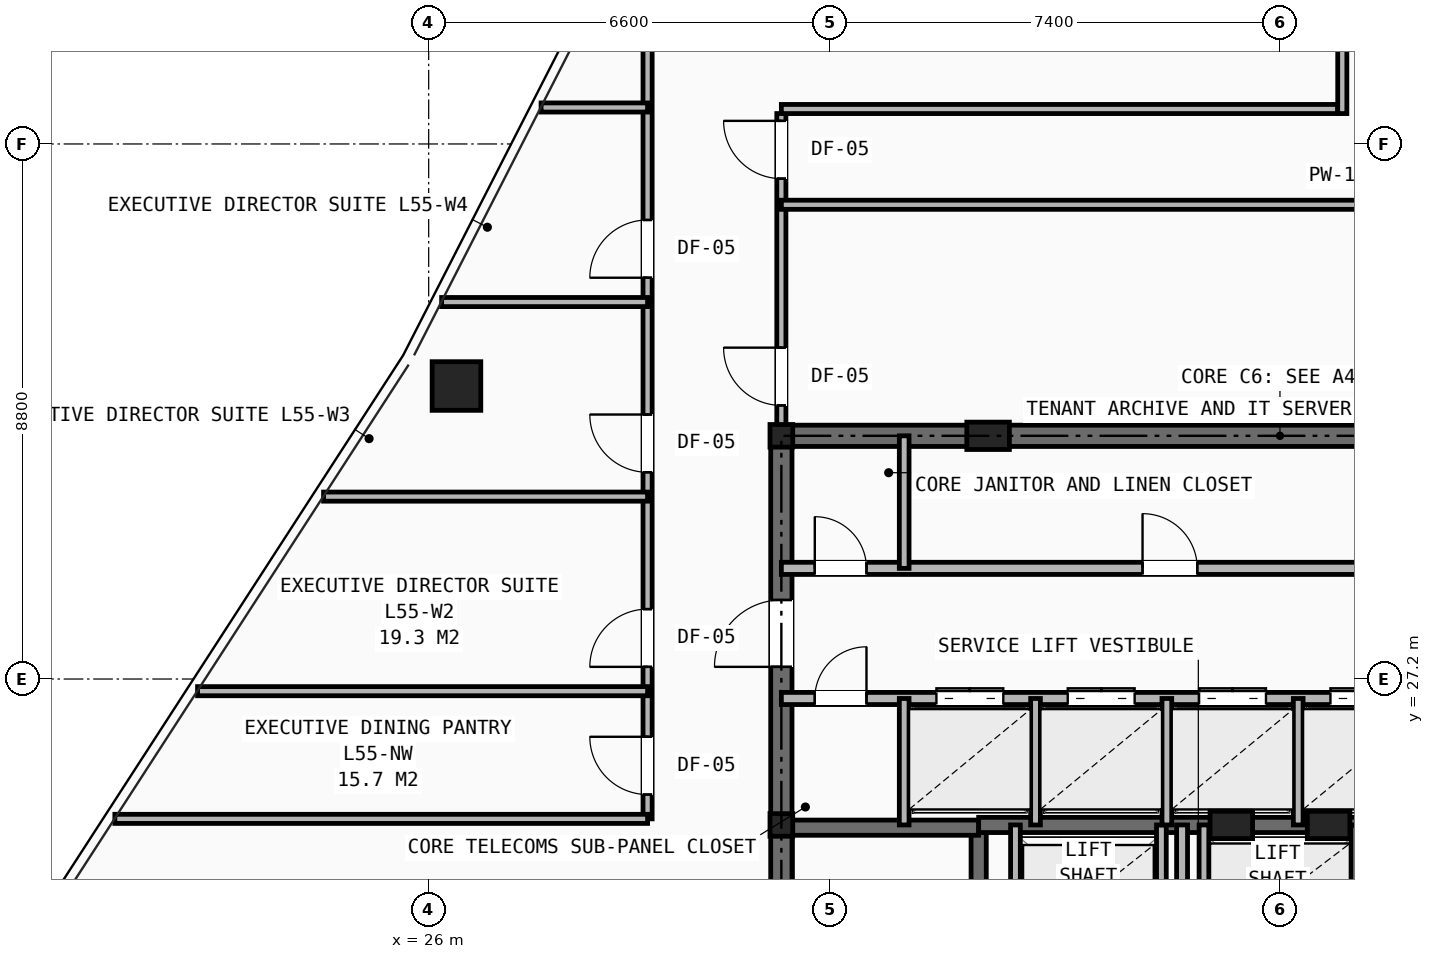
"""IFC4 building model, lengths in metres.
Left out: names, types, materials, properties, quantities, classifications, styles, units other than length and angle.
Written with IfcOpenShell. Run it as: python <this file> out.ifc"""

import sys

from ifc_helpers import new_model, si_unit, direction, frame, frame_2d, origin, origin_2d, place, context, subcontext, project, spatial, rectangle, hollow_rectangle, i_section, extrude, element, fill, save


model = new_model("IFC4")
c1 = context("Model", 3, precision=1e-05, world=origin(), true_north=direction((0.0, 1.0)))
c2 = subcontext(c1, "Body", "Model", "MODEL_VIEW")
j1 = project(units=[si_unit("LENGTHUNIT", "METRE"), si_unit("PLANEANGLEUNIT", "RADIAN")], contexts=[c1])
p1 = place(None, origin())
s1 = spatial("IfcSite", under=j1, at=p1, CompositionType="ELEMENT")
p2 = place(p1, origin())
s2 = spatial("IfcBuilding", under=s1, at=p2, CompositionType="ELEMENT")
p3 = place(p2, frame((0.0, 0.0, 193.05)))
s3 = spatial("IfcBuildingStorey", under=s2, at=p3, CompositionType="ELEMENT", Elevation=193.05)
for number, where, z_axis, x_axis in (
    (1, (31.8, 24.8, 0.0), (0.0, 0.0, 1.0), (1.0, 0.0, 0.0)),
    (2, (31.8, 31.2, 0.0), (0.0, 0.0, 1.0), (1.0, 0.0, 0.0)),
):
    element("IfcColumn", number, at=place(p3, frame(where, z_axis=z_axis, x_axis=x_axis)), inside=s3, PredefinedType="COLUMN", context=c2, shape_type="SweptSolid", body=[
        extrude(i_section(OverallWidth=0.374, OverallDepth=0.372, WebThickness=0.016, FlangeThickness=0.026, at=origin_2d()), origin(), (0.0, 0.0, 1.0), 3.45),
    ])
for number, where, z_axis, x_axis in (
    (3, (35.2, 31.2, 0.0), (0.0, 0.0, 1.0), (1.0, 0.0, 0.0)),
    (4, (39.2, 24.8, 0.0), (0.0, 0.0, 1.0), (1.0, 0.0, 0.0)),
    (5, (40.8, 24.8, 0.0), (0.0, 0.0, 1.0), (1.0, 0.0, 0.0)),
):
    element("IfcColumn", number, at=place(p3, frame(where, z_axis=z_axis, x_axis=x_axis)), inside=s3, PredefinedType="PILASTER", context=c2, shape_type="SweptSolid", body=[
        extrude(rectangle(XDim=0.7, YDim=0.45, at=origin_2d()), origin(), (0.0, 0.0, 1.0), 3.45),
    ])
p4 = place(p3, frame((26.457, 32.019, 0.0), z_axis=(0.0, 0.0, 1.0), x_axis=(1.0, 0.0, 0.0)))
e6 = element("IfcColumn", 6, at=p4, inside=s3, PredefinedType="COLUMN", context=c2, shape_type="SweptSolid", body=[
    extrude(hollow_rectangle(XDim=0.8, YDim=0.8, WallThickness=0.055, at=origin_2d()), origin(), (0.0, 0.0, 1.0), 3.45),
])
p5 = place(p3, frame((31.8, 31.2, 0.0), z_axis=(0.0, 0.0, 1.0), x_axis=(1.0, 0.0, 0.0)))
e7 = element("IfcWall", 7, at=p5, inside=s3, PredefinedType="SHEAR", context=c2, shape_type="SweptSolid", body=[
    extrude(rectangle(XDim=16.4, YDim=0.35, at=frame_2d((8.2, 0.0))), origin(), (0.0, 0.0, 1.0), 3.03),
])
p6 = place(p3, frame((31.8, 16.4, 0.0), z_axis=(0.0, 0.0, 1.0), x_axis=(0.0, 1.0, 0.0)))
e8 = element("IfcWall", 8, at=p6, inside=s3, PredefinedType="SHEAR", context=c2, shape_type="SweptSolid", body=[
    extrude(rectangle(XDim=14.8, YDim=0.35, at=frame_2d((7.4, 0.0))), origin(), (0.0, 0.0, 1.0), 3.03),
])
p7 = place(p6, frame((11.0, 0.0, 0.0)))
e9 = element("IfcOpeningElement", 9, at=p7, cuts=e8, PredefinedType="OPENING", context=c2, shape_type="SweptSolid", body=[
    extrude(rectangle(XDim=1.1, YDim=2.15, at=frame_2d((0.55, 1.075))), frame((0.0, 0.185, 0.0), z_axis=(0.0, -1.0, 0.0), x_axis=(1.0, 0.0, 0.0)), (0.0, 0.0, 1.0), 0.37),
])
p8 = place(p3, frame((35.045, 16.4, 0.0), z_axis=(0.0, 0.0, 1.0), x_axis=(0.0, 1.0, 0.0)))
e10 = element("IfcWall", 10, at=p8, inside=s3, PredefinedType="SHEAR", context=c2, shape_type="SweptSolid", body=[
    extrude(rectangle(XDim=8.4, YDim=0.25, at=frame_2d((4.2, 0.0))), origin(), (0.0, 0.0, 1.0), 3.03),
])
p9 = place(p8, frame((0.45, 0.0, 0.0)))
e11 = element("IfcOpeningElement", 11, at=p9, cuts=e10, PredefinedType="OPENING", context=c2, shape_type="SweptSolid", body=[
    extrude(rectangle(XDim=0.95, YDim=2.1, at=frame_2d((0.475, 1.05))), frame((0.0, 0.135, 0.0), z_axis=(0.0, -1.0, 0.0), x_axis=(1.0, 0.0, 0.0)), (0.0, 0.0, 1.0), 0.27),
])
p10 = place(p3, frame((31.8, 24.755, 0.0), z_axis=(0.0, 0.0, 1.0), x_axis=(1.0, 0.0, 0.0)))
e12 = element("IfcWall", 12, at=p10, inside=s3, PredefinedType="SHEAR", context=c2, shape_type="SweptSolid", body=[
    extrude(rectangle(XDim=3.245, YDim=0.25, at=frame_2d((1.623, 0.0))), origin(), (0.0, 0.0, 1.0), 3.03),
])
p11 = place(p3, frame((35.045, 24.8, 0.0), z_axis=(0.0, 0.0, 1.0), x_axis=(1.0, 0.0, 0.0)))
e13 = element("IfcWall", 13, at=p11, inside=s3, PredefinedType="SHEAR", context=c2, shape_type="SweptSolid", body=[
    extrude(rectangle(XDim=9.91, YDim=0.25, at=frame_2d((4.955, 0.0))), origin(), (0.0, 0.0, 1.0), 3.03),
])
p12 = place(p3, frame((38.39, 16.4, 0.0), z_axis=(0.0, 0.0, 1.0), x_axis=(0.0, 1.0, 0.0)))
e14 = element("IfcWall", 14, at=p12, inside=s3, PredefinedType="PARTITIONING", context=c2, shape_type="SweptSolid", body=[
    extrude(rectangle(XDim=8.4, YDim=0.18, at=frame_2d((4.2, 0.0))), origin(), (0.0, 0.0, 1.0), 2.758),
])
p13 = place(p12, frame((4.45, 0.0, 0.0)))
e15 = element("IfcOpeningElement", 15, at=p13, cuts=e14, PredefinedType="OPENING", context=c2, shape_type="SweptSolid", body=[
    extrude(rectangle(XDim=0.95, YDim=2.1, at=frame_2d((0.475, 1.05))), frame((0.0, 0.1, 0.0), z_axis=(0.0, -1.0, 0.0), x_axis=(1.0, 0.0, 0.0)), (0.0, 0.0, 1.0), 0.2),
])
for number, where, z_axis, x_axis in (
    (16, (35.65, 22.48, 0.0), (0.0, 0.0, 1.0), (0.0, 1.0, 0.0)),
    (17, (38.05, 22.48, 0.0), (0.0, 0.0, 1.0), (0.0, 1.0, 0.0)),
    (18, (38.75, 22.48, 0.0), (0.0, 0.0, 1.0), (0.0, 1.0, 0.0)),
    (19, (41.25, 22.48, 0.0), (0.0, 0.0, 1.0), (0.0, 1.0, 0.0)),
):
    element("IfcWall", number, at=place(p3, frame(where, z_axis=z_axis, x_axis=x_axis)), inside=s3, PredefinedType="SOLIDWALL", context=c2, shape_type="SweptSolid", body=[
        extrude(rectangle(XDim=2.32, YDim=0.16, at=frame_2d((1.16, 0.0))), origin(), (0.0, 0.0, 1.0), 3.03),
    ])
p14 = place(p3, frame((31.8, 29.02, 0.0), z_axis=(0.0, 0.0, 1.0), x_axis=(1.0, 0.0, 0.0)))
e20 = element("IfcWall", 20, at=p14, inside=s3, PredefinedType="SOLIDWALL", context=c2, shape_type="SweptSolid", body=[
    extrude(rectangle(XDim=16.4, YDim=0.2, at=frame_2d((8.2, 0.0))), origin(), (0.0, 0.0, 1.0), 2.485),
])
p15 = place(p14, frame((0.55, 0.0, 0.0)))
e21 = element("IfcOpeningElement", 21, at=p15, cuts=e20, PredefinedType="OPENING", context=c2, shape_type="SweptSolid", body=[
    extrude(rectangle(XDim=0.85, YDim=2.05, at=frame_2d((0.425, 1.025))), frame((0.0, 0.11, 0.0), z_axis=(0.0, -1.0, 0.0), x_axis=(1.0, 0.0, 0.0)), (0.0, 0.0, 1.0), 0.22),
])
p16 = place(p14, frame((5.94, 0.0, 0.0)))
e22 = element("IfcOpeningElement", 22, at=p16, cuts=e20, PredefinedType="OPENING", context=c2, shape_type="SweptSolid", body=[
    extrude(rectangle(XDim=0.9, YDim=2.1, at=frame_2d((0.45, 1.05))), frame((0.0, 0.11, 0.0), z_axis=(0.0, -1.0, 0.0), x_axis=(1.0, 0.0, 0.0)), (0.0, 0.0, 1.0), 0.22),
])
p17 = place(p3, frame((31.8, 26.88, 0.0), z_axis=(0.0, 0.0, 1.0), x_axis=(1.0, 0.0, 0.0)))
e23 = element("IfcWall", 23, at=p17, inside=s3, PredefinedType="SOLIDWALL", context=c2, shape_type="SweptSolid", body=[
    extrude(rectangle(XDim=16.4, YDim=0.2, at=frame_2d((8.2, 0.0))), origin(), (0.0, 0.0, 1.0), 2.485),
])
p18 = place(p17, frame((0.55, 0.0, 0.0)))
e24 = element("IfcOpeningElement", 24, at=p18, cuts=e23, PredefinedType="OPENING", context=c2, shape_type="SweptSolid", body=[
    extrude(rectangle(XDim=0.85, YDim=2.05, at=frame_2d((0.425, 1.025))), frame((0.0, 0.11, 0.0), z_axis=(0.0, -1.0, 0.0), x_axis=(1.0, 0.0, 0.0)), (0.0, 0.0, 1.0), 0.22),
])
p19 = place(p17, frame((2.55, 0.0, 0.0)))
e25 = element("IfcOpeningElement", 25, at=p19, cuts=e23, PredefinedType="OPENING", context=c2, shape_type="SweptSolid", body=[
    extrude(rectangle(XDim=1.1, YDim=2.15, at=frame_2d((0.55, 1.075))), frame((0.0, 0.11, 0.0), z_axis=(0.0, -1.0, 0.0), x_axis=(1.0, 0.0, 0.0)), (0.0, 0.0, 1.0), 0.22),
])
p20 = place(p17, frame((4.71, 0.0, 0.0)))
e26 = element("IfcOpeningElement", 26, at=p20, cuts=e23, PredefinedType="OPENING", context=c2, shape_type="SweptSolid", body=[
    extrude(rectangle(XDim=1.1, YDim=2.15, at=frame_2d((0.55, 1.075))), frame((0.0, 0.11, 0.0), z_axis=(0.0, -1.0, 0.0), x_axis=(1.0, 0.0, 0.0)), (0.0, 0.0, 1.0), 0.22),
])
p21 = place(p17, frame((6.87, 0.0, 0.0)))
e27 = element("IfcOpeningElement", 27, at=p21, cuts=e23, PredefinedType="OPENING", context=c2, shape_type="SweptSolid", body=[
    extrude(rectangle(XDim=1.1, YDim=2.15, at=frame_2d((0.55, 1.075))), frame((0.0, 0.11, 0.0), z_axis=(0.0, -1.0, 0.0), x_axis=(1.0, 0.0, 0.0)), (0.0, 0.0, 1.0), 0.22),
])
p22 = place(p17, frame((9.03, 0.0, 0.0)))
e28 = element("IfcOpeningElement", 28, at=p22, cuts=e23, PredefinedType="OPENING", context=c2, shape_type="SweptSolid", body=[
    extrude(rectangle(XDim=1.1, YDim=2.15, at=frame_2d((0.55, 1.075))), frame((0.0, 0.11, 0.0), z_axis=(0.0, -1.0, 0.0), x_axis=(1.0, 0.0, 0.0)), (0.0, 0.0, 1.0), 0.22),
])
p23 = place(p3, frame((33.82, 29.02, 0.0), z_axis=(0.0, 0.0, 1.0), x_axis=(0.0, 1.0, 0.0)))
e29 = element("IfcWall", 29, at=p23, inside=s3, PredefinedType="SOLIDWALL", context=c2, shape_type="SweptSolid", body=[
    extrude(rectangle(XDim=2.18, YDim=0.16, at=frame_2d((1.09, 0.0))), origin(), (0.0, 0.0, 1.0), 2.758),
])
for number, where, z_axis, x_axis in (
    (30, (33.82, 24.8, 0.0), (0.0, 0.0, 1.0), (0.0, 1.0, 0.0)),
    (31, (35.98, 24.8, 0.0), (0.0, 0.0, 1.0), (0.0, 1.0, 0.0)),
    (32, (38.14, 24.8, 0.0), (0.0, 0.0, 1.0), (0.0, 1.0, 0.0)),
    (33, (40.3, 24.8, 0.0), (0.0, 0.0, 1.0), (0.0, 1.0, 0.0)),
):
    element("IfcWall", number, at=place(p3, frame(where, z_axis=z_axis, x_axis=x_axis)), inside=s3, PredefinedType="SOLIDWALL", context=c2, shape_type="SweptSolid", body=[
        extrude(rectangle(XDim=2.08, YDim=0.16, at=frame_2d((1.04, 0.0))), origin(), (0.0, 0.0, 1.0), 3.03),
    ])
p24 = place(p3, frame((29.6, 24.9, 0.0), z_axis=(0.0, 0.0, 1.0), x_axis=(0.0, 1.0, 0.0)))
e34 = element("IfcWall", 34, at=p24, inside=s3, PredefinedType="PARTITIONING", context=c2, shape_type="SweptSolid", body=[
    extrude(rectangle(XDim=13.9, YDim=0.15, at=frame_2d((6.95, 0.0))), origin(), (0.0, 0.0, 1.0), 2.241),
])
p25 = place(p24, frame((0.4, 0.0, 0.0)))
e35 = element("IfcOpeningElement", 35, at=p25, cuts=e34, PredefinedType="OPENING", context=c2, shape_type="SweptSolid", body=[
    extrude(rectangle(XDim=0.95, YDim=2.1, at=frame_2d((0.475, 1.05))), frame((0.0, 0.085, 0.0), z_axis=(0.0, -1.0, 0.0), x_axis=(1.0, 0.0, 0.0)), (0.0, 0.0, 1.0), 0.17),
])
p26 = place(p24, frame((2.5, 0.0, 0.0)))
e36 = element("IfcOpeningElement", 36, at=p26, cuts=e34, PredefinedType="OPENING", context=c2, shape_type="SweptSolid", body=[
    extrude(rectangle(XDim=0.95, YDim=2.1, at=frame_2d((0.475, 1.05))), frame((0.0, 0.085, 0.0), z_axis=(0.0, -1.0, 0.0), x_axis=(1.0, 0.0, 0.0)), (0.0, 0.0, 1.0), 0.17),
])
p27 = place(p24, frame((5.7, 0.0, 0.0)))
e37 = element("IfcOpeningElement", 37, at=p27, cuts=e34, PredefinedType="OPENING", context=c2, shape_type="SweptSolid", body=[
    extrude(rectangle(XDim=0.95, YDim=2.1, at=frame_2d((0.475, 1.05))), frame((0.0, 0.085, 0.0), z_axis=(0.0, -1.0, 0.0), x_axis=(1.0, 0.0, 0.0)), (0.0, 0.0, 1.0), 0.17),
])
p28 = place(p24, frame((8.9, 0.0, 0.0)))
e38 = element("IfcOpeningElement", 38, at=p28, cuts=e34, PredefinedType="OPENING", context=c2, shape_type="SweptSolid", body=[
    extrude(rectangle(XDim=0.95, YDim=2.1, at=frame_2d((0.475, 1.05))), frame((0.0, 0.085, 0.0), z_axis=(0.0, -1.0, 0.0), x_axis=(1.0, 0.0, 0.0)), (0.0, 0.0, 1.0), 0.17),
])
p29 = place(p3, frame((31.8, 31.2, 0.0), z_axis=(0.0, 0.0, 1.0), x_axis=(0.0, 1.0, 0.0)))
e39 = element("IfcWall", 39, at=p29, inside=s3, PredefinedType="PARTITIONING", context=c2, shape_type="SweptSolid", body=[
    extrude(rectangle(XDim=5.3, YDim=0.15, at=frame_2d((2.65, 0.0))), origin(), (0.0, 0.0, 1.0), 2.241),
])
p30 = place(p29, frame((0.5, 0.0, 0.0)))
e40 = element("IfcOpeningElement", 40, at=p30, cuts=e39, PredefinedType="OPENING", context=c2, shape_type="SweptSolid", body=[
    extrude(rectangle(XDim=0.95, YDim=2.1, at=frame_2d((0.475, 1.05))), frame((0.0, 0.085, 0.0), z_axis=(0.0, -1.0, 0.0), x_axis=(1.0, 0.0, 0.0)), (0.0, 0.0, 1.0), 0.17),
])
p31 = place(p29, frame((4.23, 0.0, 0.0)))
e41 = element("IfcOpeningElement", 41, at=p31, cuts=e39, PredefinedType="OPENING", context=c2, shape_type="SweptSolid", body=[
    extrude(rectangle(XDim=0.95, YDim=2.1, at=frame_2d((0.475, 1.05))), frame((0.0, 0.085, 0.0), z_axis=(0.0, -1.0, 0.0), x_axis=(1.0, 0.0, 0.0)), (0.0, 0.0, 1.0), 0.17),
])
p32 = place(p3, frame((20.839, 24.9, 0.0), z_axis=(0.0, 0.0, 1.0), x_axis=(1.0, 0.0, 0.0)))
e42 = element("IfcWall", 42, at=p32, inside=s3, PredefinedType="PARTITIONING", context=c2, shape_type="SweptSolid", body=[
    extrude(rectangle(XDim=8.761, YDim=0.15, at=frame_2d((4.38, 0.0))), origin(), (0.0, 0.0, 1.0), 2.409),
])
p33 = place(p3, frame((22.199, 27.0, 0.0), z_axis=(0.0, 0.0, 1.0), x_axis=(1.0, 0.0, 0.0)))
e43 = element("IfcWall", 43, at=p33, inside=s3, PredefinedType="PARTITIONING", context=c2, shape_type="SweptSolid", body=[
    extrude(rectangle(XDim=7.401, YDim=0.15, at=frame_2d((3.701, 0.0))), origin(), (0.0, 0.0, 1.0), 2.409),
])
p34 = place(p3, frame((24.271, 30.2, 0.0), z_axis=(0.0, 0.0, 1.0), x_axis=(1.0, 0.0, 0.0)))
e44 = element("IfcWall", 44, at=p34, inside=s3, PredefinedType="PARTITIONING", context=c2, shape_type="SweptSolid", body=[
    extrude(rectangle(XDim=5.329, YDim=0.15, at=frame_2d((2.664, 0.0))), origin(), (0.0, 0.0, 1.0), 2.409),
])
p35 = place(p3, frame((26.213, 33.4, 0.0), z_axis=(0.0, 0.0, 1.0), x_axis=(1.0, 0.0, 0.0)))
e45 = element("IfcWall", 45, at=p35, inside=s3, PredefinedType="PARTITIONING", context=c2, shape_type="SweptSolid", body=[
    extrude(rectangle(XDim=3.387, YDim=0.15, at=frame_2d((1.693, 0.0))), origin(), (0.0, 0.0, 1.0), 2.409),
])
p36 = place(p3, frame((27.849, 36.6, 0.0), z_axis=(0.0, 0.0, 1.0), x_axis=(1.0, 0.0, 0.0)))
e46 = element("IfcWall", 46, at=p36, inside=s3, PredefinedType="PARTITIONING", context=c2, shape_type="SweptSolid", body=[
    extrude(rectangle(XDim=1.751, YDim=0.15, at=frame_2d((0.876, 0.0))), origin(), (0.0, 0.0, 1.0), 2.409),
])
p37 = place(p3, frame((31.8, 35.0, 0.0), z_axis=(0.0, 0.0, 1.0), x_axis=(1.0, 0.0, 0.0)))
e47 = element("IfcWall", 47, at=p37, inside=s3, PredefinedType="PARTITIONING", context=c2, shape_type="SweptSolid", body=[
    extrude(rectangle(XDim=21.169, YDim=0.15, at=frame_2d((10.584, 0.0))), origin(), (0.0, 0.0, 1.0), 2.409),
])
p38 = place(p3, frame((31.8, 36.575, 0.0), z_axis=(0.0, 0.0, 1.0), x_axis=(1.0, 0.0, 0.0)))
e48 = element("IfcWall", 48, at=p38, inside=s3, PredefinedType="PARTITIONING", context=c2, shape_type="SweptSolid", body=[
    extrude(rectangle(XDim=9.15, YDim=0.15, at=frame_2d((4.575, 0.0))), origin(), (0.0, 0.0, 1.0), 2.613),
])
p39 = place(p3, frame((41.025, 36.5, 0.0), z_axis=(0.0, 0.0, 1.0), x_axis=(0.0, 1.0, 0.0)))
e49 = element("IfcWall", 49, at=p39, inside=s3, PredefinedType="PARTITIONING", context=c2, shape_type="SweptSolid", body=[
    extrude(rectangle(XDim=1.95, YDim=0.15, at=frame_2d((0.975, 0.0))), origin(), (0.0, 0.0, 1.0), 3.03),
])
p40 = place(p15, origin())
e50 = element("IfcDoor", 50, at=p40, inside=s3, OperationType="SINGLE_SWING_LEFT", PredefinedType="DOOR", context=c2, shape_type="SweptSolid", body=[
    extrude(rectangle(XDim=0.85, YDim=2.05, at=frame_2d((0.425, 1.025))), frame((0.0, 0.025, 0.0), z_axis=(0.0, -1.0, 0.0), x_axis=(1.0, 0.0, 0.0)), (0.0, 0.0, 1.0), 0.05),
])
fill(e21, e50)
p41 = place(p18, origin())
e51 = element("IfcDoor", 51, at=p41, inside=s3, OperationType="SINGLE_SWING_RIGHT", PredefinedType="DOOR", context=c2, shape_type="SweptSolid", body=[
    extrude(rectangle(XDim=0.85, YDim=2.05, at=frame_2d((0.425, 1.025))), frame((0.0, 0.025, 0.0), z_axis=(0.0, -1.0, 0.0), x_axis=(1.0, 0.0, 0.0)), (0.0, 0.0, 1.0), 0.05),
])
fill(e24, e51)
p42 = place(p7, origin())
e52 = element("IfcDoor", 52, at=p42, inside=s3, OperationType="SINGLE_SWING_LEFT", PredefinedType="DOOR", context=c2, shape_type="SweptSolid", body=[
    extrude(rectangle(XDim=1.1, YDim=2.15, at=frame_2d((0.55, 1.075))), frame((0.0, 0.025, 0.0), z_axis=(0.0, -1.0, 0.0), x_axis=(1.0, 0.0, 0.0)), (0.0, 0.0, 1.0), 0.05),
])
fill(e9, e52)
p43 = place(p16, origin())
e53 = element("IfcDoor", 53, at=p43, inside=s3, OperationType="SINGLE_SWING_LEFT", PredefinedType="DOOR", context=c2, shape_type="SweptSolid", body=[
    extrude(rectangle(XDim=0.9, YDim=2.1, at=frame_2d((0.45, 1.05))), frame((0.0, 0.025, 0.0), z_axis=(0.0, -1.0, 0.0), x_axis=(1.0, 0.0, 0.0)), (0.0, 0.0, 1.0), 0.05),
])
fill(e22, e53)
p44 = place(p19, origin())
e54 = element("IfcDoor", 54, at=p44, inside=s3, OperationType="DOUBLE_DOOR_SLIDING", PredefinedType="DOOR", context=c2, shape_type="SweptSolid", body=[
    extrude(rectangle(XDim=1.1, YDim=2.15, at=frame_2d((0.55, 1.075))), frame((0.0, 0.025, 0.0), z_axis=(0.0, -1.0, 0.0), x_axis=(1.0, 0.0, 0.0)), (0.0, 0.0, 1.0), 0.05),
])
fill(e25, e54)
p45 = place(p20, origin())
e55 = element("IfcDoor", 55, at=p45, inside=s3, OperationType="DOUBLE_DOOR_SLIDING", PredefinedType="DOOR", context=c2, shape_type="SweptSolid", body=[
    extrude(rectangle(XDim=1.1, YDim=2.15, at=frame_2d((0.55, 1.075))), frame((0.0, 0.025, 0.0), z_axis=(0.0, -1.0, 0.0), x_axis=(1.0, 0.0, 0.0)), (0.0, 0.0, 1.0), 0.05),
])
fill(e26, e55)
p46 = place(p21, origin())
e56 = element("IfcDoor", 56, at=p46, inside=s3, OperationType="DOUBLE_DOOR_SLIDING", PredefinedType="DOOR", context=c2, shape_type="SweptSolid", body=[
    extrude(rectangle(XDim=1.1, YDim=2.15, at=frame_2d((0.55, 1.075))), frame((0.0, 0.025, 0.0), z_axis=(0.0, -1.0, 0.0), x_axis=(1.0, 0.0, 0.0)), (0.0, 0.0, 1.0), 0.05),
])
fill(e27, e56)
p47 = place(p22, origin())
e57 = element("IfcDoor", 57, at=p47, inside=s3, OperationType="DOUBLE_DOOR_SLIDING", PredefinedType="DOOR", context=c2, shape_type="SweptSolid", body=[
    extrude(rectangle(XDim=1.1, YDim=2.15, at=frame_2d((0.55, 1.075))), frame((0.0, 0.025, 0.0), z_axis=(0.0, -1.0, 0.0), x_axis=(1.0, 0.0, 0.0)), (0.0, 0.0, 1.0), 0.05),
])
fill(e28, e57)
p48 = place(p25, origin())
e58 = element("IfcDoor", 58, at=p48, inside=s3, OperationType="SINGLE_SWING_RIGHT", PredefinedType="DOOR", context=c2, shape_type="SweptSolid", body=[
    extrude(rectangle(XDim=0.95, YDim=2.1, at=frame_2d((0.475, 1.05))), frame((0.0, 0.025, 0.0), z_axis=(0.0, -1.0, 0.0), x_axis=(1.0, 0.0, 0.0)), (0.0, 0.0, 1.0), 0.05),
])
fill(e35, e58)
p49 = place(p26, origin())
e59 = element("IfcDoor", 59, at=p49, inside=s3, OperationType="SINGLE_SWING_LEFT", PredefinedType="DOOR", context=c2, shape_type="SweptSolid", body=[
    extrude(rectangle(XDim=0.95, YDim=2.1, at=frame_2d((0.475, 1.05))), frame((0.0, 0.025, 0.0), z_axis=(0.0, -1.0, 0.0), x_axis=(1.0, 0.0, 0.0)), (0.0, 0.0, 1.0), 0.05),
])
fill(e36, e59)
p50 = place(p27, origin())
e60 = element("IfcDoor", 60, at=p50, inside=s3, OperationType="SINGLE_SWING_RIGHT", PredefinedType="DOOR", context=c2, shape_type="SweptSolid", body=[
    extrude(rectangle(XDim=0.95, YDim=2.1, at=frame_2d((0.475, 1.05))), frame((0.0, 0.025, 0.0), z_axis=(0.0, -1.0, 0.0), x_axis=(1.0, 0.0, 0.0)), (0.0, 0.0, 1.0), 0.05),
])
fill(e37, e60)
p51 = place(p28, origin())
e61 = element("IfcDoor", 61, at=p51, inside=s3, OperationType="SINGLE_SWING_LEFT", PredefinedType="DOOR", context=c2, shape_type="SweptSolid", body=[
    extrude(rectangle(XDim=0.95, YDim=2.1, at=frame_2d((0.475, 1.05))), frame((0.0, 0.025, 0.0), z_axis=(0.0, -1.0, 0.0), x_axis=(1.0, 0.0, 0.0)), (0.0, 0.0, 1.0), 0.05),
])
fill(e38, e61)
p52 = place(p30, origin())
e62 = element("IfcDoor", 62, at=p52, inside=s3, OperationType="SINGLE_SWING_RIGHT", PredefinedType="DOOR", context=c2, shape_type="SweptSolid", body=[
    extrude(rectangle(XDim=0.95, YDim=2.1, at=frame_2d((0.475, 1.05))), frame((0.0, 0.025, 0.0), z_axis=(0.0, -1.0, 0.0), x_axis=(1.0, 0.0, 0.0)), (0.0, 0.0, 1.0), 0.05),
])
fill(e40, e62)
p53 = place(p31, origin())
e63 = element("IfcDoor", 63, at=p53, inside=s3, OperationType="SINGLE_SWING_RIGHT", PredefinedType="DOOR", context=c2, shape_type="SweptSolid", body=[
    extrude(rectangle(XDim=0.95, YDim=2.1, at=frame_2d((0.475, 1.05))), frame((0.0, 0.025, 0.0), z_axis=(0.0, -1.0, 0.0), x_axis=(1.0, 0.0, 0.0)), (0.0, 0.0, 1.0), 0.05),
])
fill(e41, e63)
save(model, sys.argv[1])
